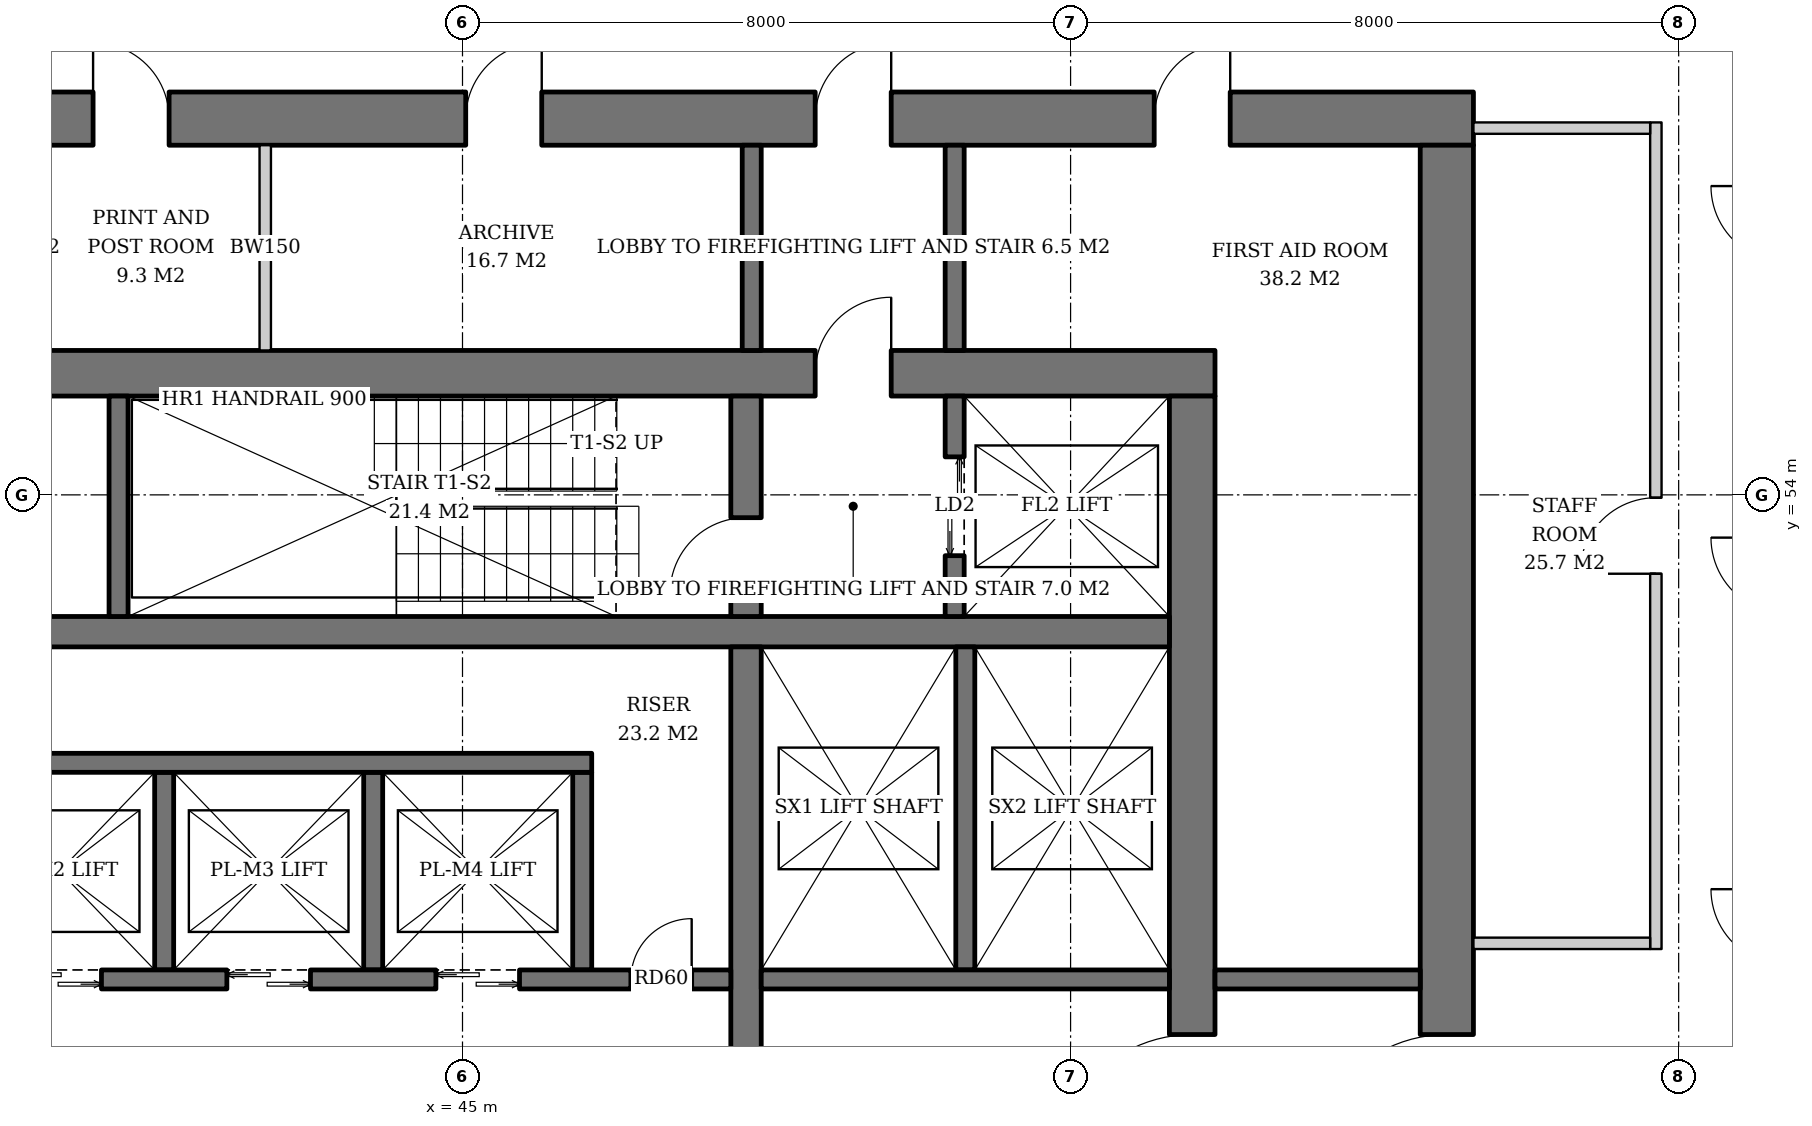
"""IFC4 building model, lengths in metres.
Left out: names, types, materials, properties, quantities, classifications, styles, units other than length and angle.
Written with IfcOpenShell. Run it as: python <this file> out.ifc"""

import sys

from ifc_helpers import new_model, si_unit, direction, frame, frame_2d, origin, place, context, subcontext, project, spatial, rectangle, extrude, element, fill, save


model = new_model("IFC4")
c1 = context("Model", 3, precision=1e-05, world=origin(), true_north=direction((0.0, 1.0)))
c2 = subcontext(c1, "Body", "Model", "MODEL_VIEW")
j1 = project(units=[si_unit("LENGTHUNIT", "METRE"), si_unit("PLANEANGLEUNIT", "RADIAN")], contexts=[c1])
p1 = place(None, origin())
s1 = spatial("IfcSite", under=j1, at=p1, CompositionType="ELEMENT")
p2 = place(p1, origin())
s2 = spatial("IfcBuilding", under=s1, at=p2, CompositionType="ELEMENT")
p3 = place(p2, frame((0.0, 0.0, 142.6)))
s3 = spatial("IfcBuildingStorey", under=s2, at=p3, CompositionType="ELEMENT", Elevation=142.6)
p4 = place(p3, frame((35.1, 55.6, 0.0), z_axis=(0.0, 0.0, 1.0), x_axis=(1.0, 0.0, 0.0)))
e1 = element("IfcWall", 1, at=p4, inside=s3, PredefinedType="SHEAR", context=c2, shape_type="SweptSolid", body=[
    extrude(rectangle(XDim=19.8, YDim=0.6, at=frame_2d((9.9, 0.0))), origin(), (0.0, 0.0, 1.0), 3.8),
])
p5 = place(p4, frame((14.54, 0.0, 0.0)))
e2 = element("IfcOpeningElement", 2, at=p5, cuts=e1, PredefinedType="OPENING", context=c2, shape_type="SweptSolid", body=[
    extrude(rectangle(XDim=1.0, YDim=2.1, at=frame_2d((0.5, 1.05))), frame((0.0, 0.31, 0.0), z_axis=(0.0, -1.0, 0.0), x_axis=(1.0, 0.0, 0.0)), (0.0, 0.0, 1.0), 0.62),
])
p6 = place(p4, frame((2.425, 0.0, 0.0)))
e3 = element("IfcOpeningElement", 3, at=p6, cuts=e1, PredefinedType="OPENING", context=c2, shape_type="SweptSolid", body=[
    extrude(rectangle(XDim=1.0, YDim=2.1, at=frame_2d((0.5, 1.05))), frame((0.0, 0.31, 0.0), z_axis=(0.0, -1.0, 0.0), x_axis=(1.0, 0.0, 0.0)), (0.0, 0.0, 1.0), 0.62),
])
p7 = place(p3, frame((54.6, 36.7, 0.0), z_axis=(0.0, 0.0, 1.0), x_axis=(0.0, 1.0, 0.0)))
e4 = element("IfcWall", 4, at=p7, inside=s3, PredefinedType="SHEAR", context=c2, shape_type="SweptSolid", body=[
    extrude(rectangle(XDim=18.6, YDim=0.6, at=frame_2d((9.3, 0.0))), origin(), (0.0, 0.0, 1.0), 3.8),
])
p8 = place(p7, frame((8.4, 0.0, 0.0)))
e5 = element("IfcOpeningElement", 5, at=p8, cuts=e4, PredefinedType="OPENING", context=c2, shape_type="SweptSolid", body=[
    extrude(rectangle(XDim=1.8, YDim=2.4, at=frame_2d((0.9, 1.2))), frame((0.0, 0.31, 0.0), z_axis=(0.0, -1.0, 0.0), x_axis=(1.0, 0.0, 0.0)), (0.0, 0.0, 1.0), 0.62),
])
p9 = place(p3, frame((31.7, 58.95, 0.0), z_axis=(0.0, 0.0, 1.0), x_axis=(1.0, 0.0, 0.0)))
e6 = element("IfcWall", 6, at=p9, inside=s3, PredefinedType="SHEAR", context=c2, shape_type="SweptSolid", body=[
    extrude(rectangle(XDim=26.6, YDim=0.7, at=frame_2d((13.3, 0.0))), origin(), (0.0, 0.0, 1.0), 3.8),
])
p10 = place(p9, frame((17.94, 0.0, 0.0)))
e7 = element("IfcOpeningElement", 7, at=p10, cuts=e6, PredefinedType="OPENING", context=c2, shape_type="SweptSolid", body=[
    extrude(rectangle(XDim=1.0, YDim=2.1, at=frame_2d((0.5, 1.05))), frame((0.0, 0.36, 0.0), z_axis=(0.0, -1.0, 0.0), x_axis=(1.0, 0.0, 0.0)), (0.0, 0.0, 1.0), 0.72),
])
p11 = place(p9, frame((5.825, 0.0, 0.0)))
e8 = element("IfcOpeningElement", 8, at=p11, cuts=e6, PredefinedType="OPENING", context=c2, shape_type="SweptSolid", body=[
    extrude(rectangle(XDim=1.0, YDim=2.1, at=frame_2d((0.5, 1.05))), frame((0.0, 0.36, 0.0), z_axis=(0.0, -1.0, 0.0), x_axis=(1.0, 0.0, 0.0)), (0.0, 0.0, 1.0), 0.72),
])
p12 = place(p9, frame((0.978, 0.0, 0.0)))
e9 = element("IfcOpeningElement", 9, at=p12, cuts=e6, PredefinedType="OPENING", context=c2, shape_type="SweptSolid", body=[
    extrude(rectangle(XDim=1.0, YDim=2.1, at=frame_2d((0.5, 1.05))), frame((0.0, 0.36, 0.0), z_axis=(0.0, -1.0, 0.0), x_axis=(1.0, 0.0, 0.0)), (0.0, 0.0, 1.0), 0.72),
])
p13 = place(p9, frame((2.587, 0.0, 0.0)))
e10 = element("IfcOpeningElement", 10, at=p13, cuts=e6, PredefinedType="OPENING", context=c2, shape_type="SweptSolid", body=[
    extrude(rectangle(XDim=1.0, YDim=2.1, at=frame_2d((0.5, 1.05))), frame((0.0, 0.36, 0.0), z_axis=(0.0, -1.0, 0.0), x_axis=(1.0, 0.0, 0.0)), (0.0, 0.0, 1.0), 0.72),
])
p14 = place(p9, frame((4.211, 0.0, 0.0)))
e11 = element("IfcOpeningElement", 11, at=p14, cuts=e6, PredefinedType="OPENING", context=c2, shape_type="SweptSolid", body=[
    extrude(rectangle(XDim=1.0, YDim=2.1, at=frame_2d((0.5, 1.05))), frame((0.0, 0.36, 0.0), z_axis=(0.0, -1.0, 0.0), x_axis=(1.0, 0.0, 0.0)), (0.0, 0.0, 1.0), 0.72),
])
p15 = place(p9, frame((8.44, 0.0, 0.0)))
e12 = element("IfcOpeningElement", 12, at=p15, cuts=e6, PredefinedType="OPENING", context=c2, shape_type="SweptSolid", body=[
    extrude(rectangle(XDim=1.0, YDim=2.1, at=frame_2d((0.5, 1.05))), frame((0.0, 0.36, 0.0), z_axis=(0.0, -1.0, 0.0), x_axis=(1.0, 0.0, 0.0)), (0.0, 0.0, 1.0), 0.72),
])
p16 = place(p9, frame((13.342, 0.0, 0.0)))
e13 = element("IfcOpeningElement", 13, at=p16, cuts=e6, PredefinedType="OPENING", context=c2, shape_type="SweptSolid", body=[
    extrude(rectangle(XDim=1.0, YDim=2.1, at=frame_2d((0.5, 1.05))), frame((0.0, 0.36, 0.0), z_axis=(0.0, -1.0, 0.0), x_axis=(1.0, 0.0, 0.0)), (0.0, 0.0, 1.0), 0.72),
])
p17 = place(p9, frame((22.4, 0.0, 0.0)))
e14 = element("IfcOpeningElement", 14, at=p17, cuts=e6, PredefinedType="OPENING", context=c2, shape_type="SweptSolid", body=[
    extrude(rectangle(XDim=1.0, YDim=2.1, at=frame_2d((0.5, 1.05))), frame((0.0, 0.36, 0.0), z_axis=(0.0, -1.0, 0.0), x_axis=(1.0, 0.0, 0.0)), (0.0, 0.0, 1.0), 0.72),
])
p18 = place(p3, frame((57.95, 33.4, 0.0), z_axis=(0.0, 0.0, 1.0), x_axis=(0.0, 1.0, 0.0)))
e15 = element("IfcWall", 15, at=p18, inside=s3, PredefinedType="SHEAR", context=c2, shape_type="SweptSolid", body=[
    extrude(rectangle(XDim=25.2, YDim=0.7, at=frame_2d((12.6, 0.0))), origin(), (0.0, 0.0, 1.0), 3.8),
])
p19 = place(p18, frame((11.7, 0.0, 0.0)))
e16 = element("IfcOpeningElement", 16, at=p19, cuts=e15, PredefinedType="OPENING", context=c2, shape_type="SweptSolid", body=[
    extrude(rectangle(XDim=1.8, YDim=2.4, at=frame_2d((0.9, 1.2))), frame((0.0, 0.36, 0.0), z_axis=(0.0, -1.0, 0.0), x_axis=(1.0, 0.0, 0.0)), (0.0, 0.0, 1.0), 0.72),
])
p20 = place(p3, frame((35.7, 52.2, 0.0), z_axis=(0.0, 0.0, 1.0), x_axis=(1.0, 0.0, 0.0)))
e17 = element("IfcWall", 17, at=p20, inside=s3, PredefinedType="SHEAR", context=c2, shape_type="SweptSolid", body=[
    extrude(rectangle(XDim=18.6, YDim=0.4, at=frame_2d((9.3, 0.0))), origin(), (0.0, 0.0, 1.0), 3.8),
])
p21 = place(p3, frame((48.73, 40.0, 0.0), z_axis=(0.0, 0.0, 1.0), x_axis=(0.0, 1.0, 0.0)))
e18 = element("IfcWall", 18, at=p21, inside=s3, PredefinedType="SHEAR", context=c2, shape_type="SweptSolid", body=[
    extrude(rectangle(XDim=12.0, YDim=0.4, at=frame_2d((6.0, 0.0))), origin(), (0.0, 0.0, 1.0), 3.8),
])
p22 = place(p3, frame((48.73, 52.4, 0.0), z_axis=(0.0, 0.0, 1.0), x_axis=(0.0, 1.0, 0.0)))
e19 = element("IfcWall", 19, at=p22, inside=s3, PredefinedType="SHEAR", context=c2, shape_type="SweptSolid", body=[
    extrude(rectangle(XDim=2.9, YDim=0.4, at=frame_2d((1.45, 0.0))), origin(), (0.0, 0.0, 1.0), 3.8),
])
p23 = place(p22, frame((0.3, 0.0, 0.0)))
e20 = element("IfcOpeningElement", 20, at=p23, cuts=e19, PredefinedType="OPENING", context=c2, shape_type="SweptSolid", body=[
    extrude(rectangle(XDim=1.0, YDim=2.1, at=frame_2d((0.5, 1.05))), frame((0.0, 0.21, 0.0), z_axis=(0.0, -1.0, 0.0), x_axis=(1.0, 0.0, 0.0)), (0.0, 0.0, 1.0), 0.42),
])
p24 = place(p3, frame((40.475, 52.4, 0.0), z_axis=(0.0, 0.0, 1.0), x_axis=(0.0, 1.0, 0.0)))
e21 = element("IfcWall", 21, at=p24, inside=s3, PredefinedType="SHEAR", context=c2, shape_type="SweptSolid", body=[
    extrude(rectangle(XDim=2.9, YDim=0.25, at=frame_2d((1.45, 0.0))), origin(), (0.0, 0.0, 1.0), 3.8),
])
p25 = place(p3, frame((51.475, 52.4, 0.0), z_axis=(0.0, 0.0, 1.0), x_axis=(0.0, 1.0, 0.0)))
e22 = element("IfcWall", 22, at=p25, inside=s3, PredefinedType="SHEAR", context=c2, shape_type="SweptSolid", body=[
    extrude(rectangle(XDim=2.9, YDim=0.25, at=frame_2d((1.45, 0.0))), origin(), (0.0, 0.0, 1.0), 3.8),
])
p26 = place(p25, frame((0.8, 0.0, 0.0)))
e23 = element("IfcOpeningElement", 23, at=p26, cuts=e22, PredefinedType="OPENING", context=c2, shape_type="SweptSolid", body=[
    extrude(rectangle(XDim=1.3, YDim=2.2, at=frame_2d((0.65, 1.1))), frame((0.0, 0.135, 0.0), z_axis=(0.0, -1.0, 0.0), x_axis=(1.0, 0.0, 0.0)), (0.0, 0.0, 1.0), 0.27),
])
for number, where, z_axis, x_axis in (
    (24, (41.075, 47.75, 0.0), (0.0, 0.0, 1.0), (0.0, 1.0, 0.0)),
    (25, (43.825, 47.75, 0.0), (0.0, 0.0, 1.0), (0.0, 1.0, 0.0)),
    (26, (46.575, 47.75, 0.0), (0.0, 0.0, 1.0), (0.0, 1.0, 0.0)),
):
    element("IfcWall", number, at=place(p3, frame(where, z_axis=z_axis, x_axis=x_axis)), inside=s3, PredefinedType="SHEAR", context=c2, shape_type="SweptSolid", body=[
        extrude(rectangle(XDim=2.6, YDim=0.25, at=frame_2d((1.3, 0.0))), origin(), (0.0, 0.0, 1.0), 3.8),
    ])
p27 = place(p3, frame((35.7, 50.475, 0.0), z_axis=(0.0, 0.0, 1.0), x_axis=(1.0, 0.0, 0.0)))
e27 = element("IfcWall", 27, at=p27, inside=s3, PredefinedType="SHEAR", context=c2, shape_type="SweptSolid", body=[
    extrude(rectangle(XDim=11.0, YDim=0.25, at=frame_2d((5.5, 0.0))), origin(), (0.0, 0.0, 1.0), 3.8),
])
p28 = place(p3, frame((35.7, 47.625, 0.0), z_axis=(0.0, 0.0, 1.0), x_axis=(1.0, 0.0, 0.0)))
e28 = element("IfcWall", 28, at=p28, inside=s3, PredefinedType="SHEAR", context=c2, shape_type="SweptSolid", body=[
    extrude(rectangle(XDim=12.83, YDim=0.25, at=frame_2d((6.415, 0.0))), origin(), (0.0, 0.0, 1.0), 3.8),
])
p29 = place(p28, frame((0.7, 0.0, 0.0)))
e29 = element("IfcOpeningElement", 29, at=p29, cuts=e28, PredefinedType="OPENING", context=c2, shape_type="SweptSolid", body=[
    extrude(rectangle(XDim=1.1, YDim=2.2, at=frame_2d((0.55, 1.1))), frame((0.0, 0.135, 0.0), z_axis=(0.0, -1.0, 0.0), x_axis=(1.0, 0.0, 0.0)), (0.0, 0.0, 1.0), 0.27),
])
p30 = place(p28, frame((3.45, 0.0, 0.0)))
e30 = element("IfcOpeningElement", 30, at=p30, cuts=e28, PredefinedType="OPENING", context=c2, shape_type="SweptSolid", body=[
    extrude(rectangle(XDim=1.1, YDim=2.2, at=frame_2d((0.55, 1.1))), frame((0.0, 0.135, 0.0), z_axis=(0.0, -1.0, 0.0), x_axis=(1.0, 0.0, 0.0)), (0.0, 0.0, 1.0), 0.27),
])
p31 = place(p28, frame((6.2, 0.0, 0.0)))
e31 = element("IfcOpeningElement", 31, at=p31, cuts=e28, PredefinedType="OPENING", context=c2, shape_type="SweptSolid", body=[
    extrude(rectangle(XDim=1.1, YDim=2.2, at=frame_2d((0.55, 1.1))), frame((0.0, 0.135, 0.0), z_axis=(0.0, -1.0, 0.0), x_axis=(1.0, 0.0, 0.0)), (0.0, 0.0, 1.0), 0.27),
])
p32 = place(p28, frame((8.95, 0.0, 0.0)))
e32 = element("IfcOpeningElement", 32, at=p32, cuts=e28, PredefinedType="OPENING", context=c2, shape_type="SweptSolid", body=[
    extrude(rectangle(XDim=1.1, YDim=2.2, at=frame_2d((0.55, 1.1))), frame((0.0, 0.135, 0.0), z_axis=(0.0, -1.0, 0.0), x_axis=(1.0, 0.0, 0.0)), (0.0, 0.0, 1.0), 0.27),
])
p33 = place(p28, frame((11.515, 0.0, 0.0)))
e33 = element("IfcOpeningElement", 33, at=p33, cuts=e28, PredefinedType="OPENING", context=c2, shape_type="SweptSolid", body=[
    extrude(rectangle(XDim=0.8, YDim=2.0, at=frame_2d((0.4, 1.0))), frame((0.0, 0.135, 0.0), z_axis=(0.0, -1.0, 0.0), x_axis=(1.0, 0.0, 0.0)), (0.0, 0.0, 1.0), 0.27),
])
p34 = place(p3, frame((51.615, 47.75, 0.0), z_axis=(0.0, 0.0, 1.0), x_axis=(0.0, 1.0, 0.0)))
e34 = element("IfcWall", 34, at=p34, inside=s3, PredefinedType="SHEAR", context=c2, shape_type="SweptSolid", body=[
    extrude(rectangle(XDim=4.25, YDim=0.25, at=frame_2d((2.125, 0.0))), origin(), (0.0, 0.0, 1.0), 3.8),
])
p35 = place(p3, frame((48.93, 47.625, 0.0), z_axis=(0.0, 0.0, 1.0), x_axis=(1.0, 0.0, 0.0)))
e35 = element("IfcWall", 35, at=p35, inside=s3, PredefinedType="SHEAR", context=c2, shape_type="SweptSolid", body=[
    extrude(rectangle(XDim=5.37, YDim=0.25, at=frame_2d((2.685, 0.0))), origin(), (0.0, 0.0, 1.0), 3.8),
])
for number, where, z_axis, x_axis in (
    (36, (48.805, 55.9, 0.0), (0.0, 0.0, 1.0), (0.0, 1.0, 0.0)),
    (37, (51.475, 55.9, 0.0), (0.0, 0.0, 1.0), (0.0, 1.0, 0.0)),
    (38, (54.9, 47.625, 0.0), (0.0, 0.0, 1.0), (1.0, 0.0, 0.0)),
):
    element("IfcWall", number, at=place(p3, frame(where, z_axis=z_axis, x_axis=x_axis)), inside=s3, PredefinedType="SOLIDWALL", context=c2, shape_type="SweptSolid", body=[
        extrude(rectangle(XDim=2.7, YDim=0.25, at=frame_2d((1.35, 0.0))), origin(), (0.0, 0.0, 1.0), 3.62),
    ])
p36 = place(p3, frame((42.405, 55.9, 0.0), z_axis=(0.0, 0.0, 1.0), x_axis=(0.0, 1.0, 0.0)))
e39 = element("IfcWall", 39, at=p36, inside=s3, PredefinedType="SOLIDWALL", context=c2, shape_type="SweptSolid", body=[
    extrude(rectangle(XDim=2.7, YDim=0.15, at=frame_2d((1.35, 0.0))), origin(), (0.0, 0.0, 1.0), 3.62),
])
p37 = place(p3, frame((60.7, 48.025, 0.0), z_axis=(0.0, 0.0, 1.0), x_axis=(0.0, 1.0, 0.0)))
e40 = element("IfcWall", 40, at=p37, inside=s3, PredefinedType="PARTITIONING", context=c2, shape_type="SweptSolid", body=[
    extrude(rectangle(XDim=10.875, YDim=0.15, at=frame_2d((5.438, 0.0))), origin(), (0.0, 0.0, 1.0), 2.806),
])
p38 = place(p37, frame((4.938, 0.0, 0.0)))
e41 = element("IfcOpeningElement", 41, at=p38, cuts=e40, PredefinedType="OPENING", context=c2, shape_type="SweptSolid", body=[
    extrude(rectangle(XDim=1.0, YDim=2.1, at=frame_2d((0.5, 1.05))), frame((0.0, 0.085, 0.0), z_axis=(0.0, -1.0, 0.0), x_axis=(1.0, 0.0, 0.0)), (0.0, 0.0, 1.0), 0.17),
])
for number, where, z_axis, x_axis in (
    (42, (58.3, 48.1, 0.0), (0.0, 0.0, 1.0), (1.0, 0.0, 0.0)),
    (43, (58.3, 58.825, 0.0), (0.0, 0.0, 1.0), (1.0, 0.0, 0.0)),
):
    element("IfcWall", number, at=place(p3, frame(where, z_axis=z_axis, x_axis=x_axis)), inside=s3, PredefinedType="PARTITIONING", context=c2, shape_type="SweptSolid", body=[
        extrude(rectangle(XDim=2.325, YDim=0.15, at=frame_2d((1.163, 0.0))), origin(), (0.0, 0.0, 1.0), 3.62),
    ])
p39 = place(p26, origin())
e44 = element("IfcDoor", 44, at=p39, inside=s3, OperationType="DOUBLE_DOOR_SLIDING", PredefinedType="DOOR", context=c2, shape_type="SweptSolid", body=[
    extrude(rectangle(XDim=1.3, YDim=2.2, at=frame_2d((0.65, 1.1))), frame((0.0, 0.025, 0.0), z_axis=(0.0, -1.0, 0.0), x_axis=(1.0, 0.0, 0.0)), (0.0, 0.0, 1.0), 0.05),
])
fill(e23, e44)
p40 = place(p30, origin())
e45 = element("IfcDoor", 45, at=p40, inside=s3, OperationType="DOUBLE_DOOR_SLIDING", PredefinedType="DOOR", context=c2, shape_type="SweptSolid", body=[
    extrude(rectangle(XDim=1.1, YDim=2.2, at=frame_2d((0.55, 1.1))), frame((0.0, 0.025, 0.0), z_axis=(0.0, -1.0, 0.0), x_axis=(1.0, 0.0, 0.0)), (0.0, 0.0, 1.0), 0.05),
])
fill(e30, e45)
p41 = place(p31, origin())
e46 = element("IfcDoor", 46, at=p41, inside=s3, OperationType="DOUBLE_DOOR_SLIDING", PredefinedType="DOOR", context=c2, shape_type="SweptSolid", body=[
    extrude(rectangle(XDim=1.1, YDim=2.2, at=frame_2d((0.55, 1.1))), frame((0.0, 0.025, 0.0), z_axis=(0.0, -1.0, 0.0), x_axis=(1.0, 0.0, 0.0)), (0.0, 0.0, 1.0), 0.05),
])
fill(e31, e46)
p42 = place(p32, origin())
e47 = element("IfcDoor", 47, at=p42, inside=s3, OperationType="DOUBLE_DOOR_SLIDING", PredefinedType="DOOR", context=c2, shape_type="SweptSolid", body=[
    extrude(rectangle(XDim=1.1, YDim=2.2, at=frame_2d((0.55, 1.1))), frame((0.0, 0.025, 0.0), z_axis=(0.0, -1.0, 0.0), x_axis=(1.0, 0.0, 0.0)), (0.0, 0.0, 1.0), 0.05),
])
fill(e32, e47)
p43 = place(p33, origin())
e48 = element("IfcDoor", 48, at=p43, inside=s3, OperationType="SINGLE_SWING_RIGHT", PredefinedType="DOOR", context=c2, shape_type="SweptSolid", body=[
    extrude(rectangle(XDim=0.8, YDim=2.0, at=frame_2d((0.4, 1.0))), frame((0.0, 0.025, 0.0), z_axis=(0.0, -1.0, 0.0), x_axis=(1.0, 0.0, 0.0)), (0.0, 0.0, 1.0), 0.05),
])
fill(e33, e48)
p44 = place(p23, origin())
e49 = element("IfcDoor", 49, at=p44, inside=s3, OperationType="SINGLE_SWING_LEFT", PredefinedType="DOOR", context=c2, shape_type="SweptSolid", body=[
    extrude(rectangle(XDim=1.0, YDim=2.1, at=frame_2d((0.5, 1.05))), frame((0.0, 0.025, 0.0), z_axis=(0.0, -1.0, 0.0), x_axis=(1.0, 0.0, 0.0)), (0.0, 0.0, 1.0), 0.05),
])
fill(e20, e49)
p45 = place(p5, origin())
e50 = element("IfcDoor", 50, at=p45, inside=s3, OperationType="SINGLE_SWING_RIGHT", PredefinedType="DOOR", context=c2, shape_type="SweptSolid", body=[
    extrude(rectangle(XDim=1.0, YDim=2.1, at=frame_2d((0.5, 1.05))), frame((0.0, 0.025, 0.0), z_axis=(0.0, -1.0, 0.0), x_axis=(1.0, 0.0, 0.0)), (0.0, 0.0, 1.0), 0.05),
])
fill(e2, e50)
p46 = place(p8, origin())
e51 = element("IfcDoor", 51, at=p46, inside=s3, OperationType="DOUBLE_DOOR_SINGLE_SWING", PredefinedType="DOOR", context=c2, shape_type="SweptSolid", body=[
    extrude(rectangle(XDim=1.8, YDim=2.4, at=frame_2d((0.9, 1.2))), frame((0.0, 0.025, 0.0), z_axis=(0.0, -1.0, 0.0), x_axis=(1.0, 0.0, 0.0)), (0.0, 0.0, 1.0), 0.05),
])
fill(e5, e51)
p47 = place(p19, origin())
e52 = element("IfcDoor", 52, at=p47, inside=s3, OperationType="DOUBLE_DOOR_SINGLE_SWING", PredefinedType="DOOR", context=c2, shape_type="SweptSolid", body=[
    extrude(rectangle(XDim=1.8, YDim=2.4, at=frame_2d((0.9, 1.2))), frame((0.0, 0.025, 0.0), z_axis=(0.0, -1.0, 0.0), x_axis=(1.0, 0.0, 0.0)), (0.0, 0.0, 1.0), 0.05),
])
fill(e16, e52)
p48 = place(p10, origin())
e53 = element("IfcDoor", 53, at=p48, inside=s3, OperationType="SINGLE_SWING_RIGHT", PredefinedType="DOOR", context=c2, shape_type="SweptSolid", body=[
    extrude(rectangle(XDim=1.0, YDim=2.1, at=frame_2d((0.5, 1.05))), frame((0.0, 0.025, 0.0), z_axis=(0.0, -1.0, 0.0), x_axis=(1.0, 0.0, 0.0)), (0.0, 0.0, 1.0), 0.05),
])
fill(e7, e53)
p49 = place(p15, origin())
e54 = element("IfcDoor", 54, at=p49, inside=s3, OperationType="SINGLE_SWING_LEFT", PredefinedType="DOOR", context=c2, shape_type="SweptSolid", body=[
    extrude(rectangle(XDim=1.0, YDim=2.1, at=frame_2d((0.5, 1.05))), frame((0.0, -0.29, 0.0), z_axis=(0.0, -1.0, 0.0), x_axis=(1.0, 0.0, 0.0)), (0.0, 0.0, 1.0), 0.05),
])
fill(e12, e54)
p50 = place(p16, origin())
e55 = element("IfcDoor", 55, at=p50, inside=s3, OperationType="SINGLE_SWING_RIGHT", PredefinedType="DOOR", context=c2, shape_type="SweptSolid", body=[
    extrude(rectangle(XDim=1.0, YDim=2.1, at=frame_2d((0.5, 1.05))), frame((0.0, -0.29, 0.0), z_axis=(0.0, -1.0, 0.0), x_axis=(1.0, 0.0, 0.0)), (0.0, 0.0, 1.0), 0.05),
])
fill(e13, e55)
p51 = place(p17, origin())
e56 = element("IfcDoor", 56, at=p51, inside=s3, OperationType="SINGLE_SWING_RIGHT", PredefinedType="DOOR", context=c2, shape_type="SweptSolid", body=[
    extrude(rectangle(XDim=1.0, YDim=2.1, at=frame_2d((0.5, 1.05))), frame((0.0, -0.29, 0.0), z_axis=(0.0, -1.0, 0.0), x_axis=(1.0, 0.0, 0.0)), (0.0, 0.0, 1.0), 0.05),
])
fill(e14, e56)
p52 = place(p38, origin())
e57 = element("IfcDoor", 57, at=p52, inside=s3, OperationType="SINGLE_SWING_LEFT", PredefinedType="DOOR", context=c2, shape_type="SweptSolid", body=[
    extrude(rectangle(XDim=1.0, YDim=2.1, at=frame_2d((0.5, 1.05))), frame((0.0, 0.025, 0.0), z_axis=(0.0, -1.0, 0.0), x_axis=(1.0, 0.0, 0.0)), (0.0, 0.0, 1.0), 0.05),
])
fill(e41, e57)
save(model, sys.argv[1])
